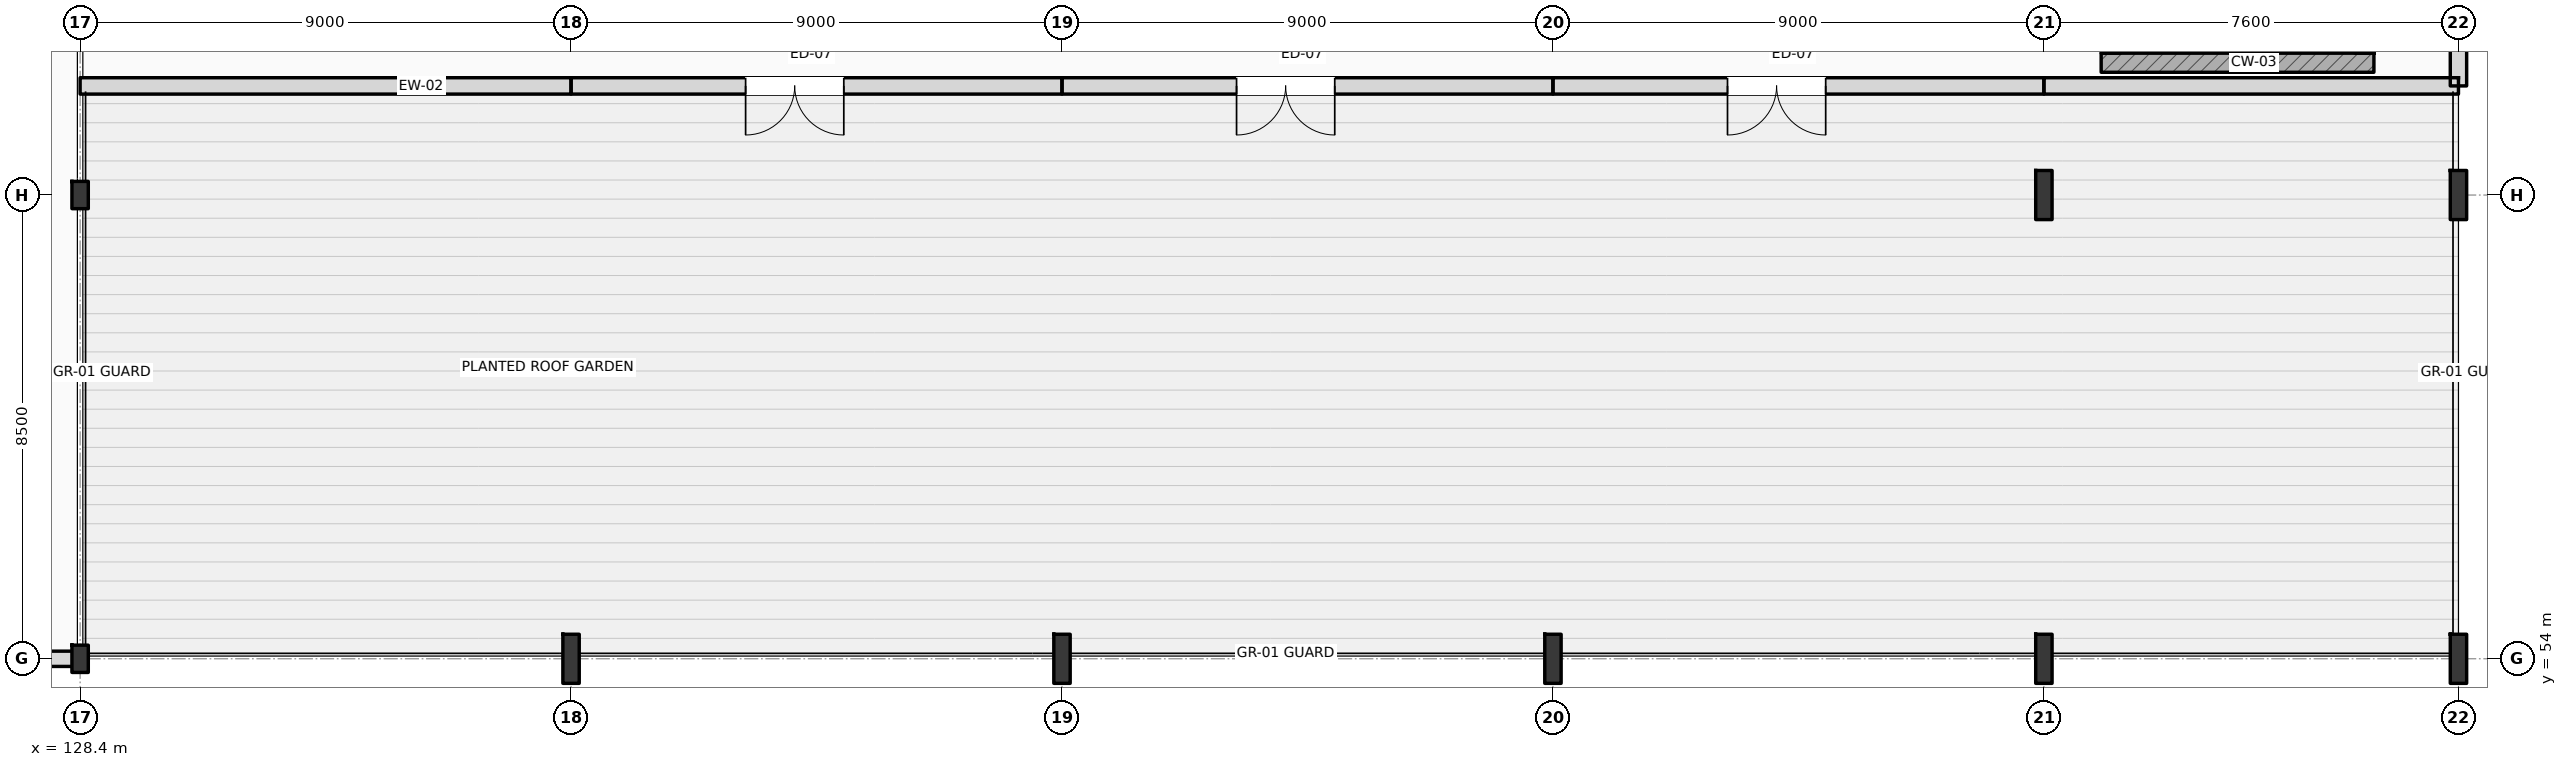
"""IFC4 building model, lengths in metres.
Left out: names, types, materials, properties, quantities, classifications, styles, units other than length and angle.
Written with IfcOpenShell. Run it as: python <this file> out.ifc"""

import sys

from ifc_helpers import new_model, si_unit, direction, frame, frame_2d, origin, origin_2d, place, context, subcontext, project, spatial, rectangle, i_section, extrude, element, fill, save


model = new_model("IFC4")
c1 = context("Model", 3, precision=1e-05, world=origin(), true_north=direction((0.0, 1.0)))
c2 = subcontext(c1, "Body", "Model", "MODEL_VIEW")
j1 = project(units=[si_unit("LENGTHUNIT", "METRE"), si_unit("PLANEANGLEUNIT", "RADIAN")], contexts=[c1])
p1 = place(None, origin())
s1 = spatial("IfcSite", under=j1, at=p1, CompositionType="ELEMENT")
p2 = place(p1, origin())
s2 = spatial("IfcBuilding", under=s1, at=p2, CompositionType="ELEMENT")
p3 = place(p2, frame((0.0, 0.0, 11.4)))
s3 = spatial("IfcBuildingStorey", under=s2, at=p3, CompositionType="ELEMENT", Elevation=11.4)
for number, where, z_axis, x_axis in (
    (1, (128.4, 54.0, 0.0), (0.0, 0.0, 1.0), (1.0, 0.0, 0.0)),
    (2, (128.4, 62.5, 0.0), (0.0, 0.0, 1.0), (1.0, 0.0, 0.0)),
):
    element("IfcColumn", number, at=place(p3, frame(where, z_axis=z_axis, x_axis=x_axis)), inside=s3, PredefinedType="COLUMN", context=c2, shape_type="SweptSolid", body=[
        extrude(i_section(OverallWidth=0.3, OverallDepth=0.5, WebThickness=0.014, FlangeThickness=0.028, FilletRadius=0.027, at=origin_2d()), origin(), (0.0, 0.0, 1.0), 4.8),
    ])
for number, where, z_axis, x_axis in (
    (3, (164.4, 54.0, 0.0), (0.0, 0.0, 1.0), (1.0, 0.0, 0.0)),
    (4, (164.4, 62.5, 0.0), (0.0, 0.0, 1.0), (1.0, 0.0, 0.0)),
    (5, (172.0, 54.0, 0.0), (0.0, 0.0, 1.0), (1.0, 0.0, 0.0)),
    (6, (172.0, 62.5, 0.0), (0.0, 0.0, 1.0), (1.0, 0.0, 0.0)),
    (7, (137.4, 54.0, 0.0), (0.0, 0.0, 1.0), (1.0, 0.0, 0.0)),
    (8, (146.4, 54.0, 0.0), (0.0, 0.0, 1.0), (1.0, 0.0, 0.0)),
    (9, (155.4, 54.0, 0.0), (0.0, 0.0, 1.0), (1.0, 0.0, 0.0)),
):
    element("IfcColumn", number, at=place(p3, frame(where, z_axis=z_axis, x_axis=x_axis)), inside=s3, PredefinedType="COLUMN", context=c2, shape_type="SweptSolid", body=[
        extrude(i_section(OverallWidth=0.3, OverallDepth=0.9, WebThickness=0.019, FlangeThickness=0.035, FilletRadius=0.03, at=origin_2d()), origin(), (0.0, 0.0, 1.0), 4.8),
    ])
p4 = place(p3, frame((165.45, 64.925, 0.0), z_axis=(0.0, 0.0, 1.0), x_axis=(1.0, 0.0, 0.0)))
e10 = element("IfcWall", 10, at=p4, inside=s3, PredefinedType="SHEAR", context=c2, shape_type="SweptSolid", body=[
    extrude(rectangle(XDim=5.0, YDim=0.35, at=frame_2d((2.5, 0.0))), origin(), (0.0, 0.0, 1.0), 4.8),
])
p5 = place(p3, frame((165.625, 65.1, 0.0), z_axis=(0.0, 0.0, 1.0), x_axis=(0.0, 1.0, 0.0)))
e11 = element("IfcWall", 11, at=p5, inside=s3, PredefinedType="SHEAR", context=c2, shape_type="SweptSolid", body=[
    extrude(rectangle(XDim=8.58, YDim=0.35, at=frame_2d((4.29, 0.0))), origin(), (0.0, 0.0, 1.0), 4.8),
])
p6 = place(p5, frame((0.225, 0.0, 0.0)))
e12 = element("IfcOpeningElement", 12, at=p6, cuts=e11, PredefinedType="OPENING", context=c2, shape_type="SweptSolid", body=[
    extrude(rectangle(XDim=1.6, YDim=2.2, at=frame_2d((0.8, 1.1))), frame((0.0, 0.185, 0.0), z_axis=(0.0, -1.0, 0.0), x_axis=(1.0, 0.0, 0.0)), (0.0, 0.0, 1.0), 0.37),
])
p7 = place(p3, frame((170.275, 65.1, 0.0), z_axis=(0.0, 0.0, 1.0), x_axis=(0.0, 1.0, 0.0)))
e13 = element("IfcWall", 13, at=p7, inside=s3, PredefinedType="SHEAR", context=c2, shape_type="SweptSolid", body=[
    extrude(rectangle(XDim=8.58, YDim=0.35, at=frame_2d((4.29, 0.0))), origin(), (0.0, 0.0, 1.0), 4.8),
])
p8 = place(p3, frame((103.2, 54.0, 0.0), z_axis=(0.0, 0.0, 1.0), x_axis=(1.0, 0.0, 0.0)))
e14 = element("IfcWall", 14, at=p8, inside=s3, PredefinedType="STANDARD", context=c2, shape_type="SweptSolid", body=[
    extrude(rectangle(XDim=25.2, YDim=0.28, at=frame_2d((12.6, 0.0))), origin(), (0.0, 0.0, 1.0), 3.96),
])
p9 = place(p3, frame((128.4, 64.5, 0.0), z_axis=(0.0, 0.0, 1.0), x_axis=(1.0, 0.0, 0.0)))
e15 = element("IfcWall", 15, at=p9, inside=s3, PredefinedType="STANDARD", context=c2, shape_type="SweptSolid", body=[
    extrude(rectangle(XDim=9.0, YDim=0.3, at=frame_2d((4.5, 0.0))), origin(), (0.0, 0.0, 1.0), 4.54),
])
p10 = place(p3, frame((137.4, 64.5, 0.0), z_axis=(0.0, 0.0, 1.0), x_axis=(1.0, 0.0, 0.0)))
e16 = element("IfcWall", 16, at=p10, inside=s3, PredefinedType="STANDARD", context=c2, shape_type="SweptSolid", body=[
    extrude(rectangle(XDim=9.0, YDim=0.3, at=frame_2d((4.5, 0.0))), origin(), (0.0, 0.0, 1.0), 4.54),
])
p11 = place(p10, frame((3.2, 0.0, 0.0)))
e17 = element("IfcOpeningElement", 17, at=p11, cuts=e16, PredefinedType="OPENING", context=c2, shape_type="SweptSolid", body=[
    extrude(rectangle(XDim=1.8, YDim=2.4, at=frame_2d((0.9, 1.2))), frame((0.0, 0.16, 0.0), z_axis=(0.0, -1.0, 0.0), x_axis=(1.0, 0.0, 0.0)), (0.0, 0.0, 1.0), 0.32),
])
p12 = place(p3, frame((146.4, 64.5, 0.0), z_axis=(0.0, 0.0, 1.0), x_axis=(1.0, 0.0, 0.0)))
e18 = element("IfcWall", 18, at=p12, inside=s3, PredefinedType="STANDARD", context=c2, shape_type="SweptSolid", body=[
    extrude(rectangle(XDim=9.0, YDim=0.3, at=frame_2d((4.5, 0.0))), origin(), (0.0, 0.0, 1.0), 4.54),
])
p13 = place(p12, frame((3.2, 0.0, 0.0)))
e19 = element("IfcOpeningElement", 19, at=p13, cuts=e18, PredefinedType="OPENING", context=c2, shape_type="SweptSolid", body=[
    extrude(rectangle(XDim=1.8, YDim=2.4, at=frame_2d((0.9, 1.2))), frame((0.0, 0.16, 0.0), z_axis=(0.0, -1.0, 0.0), x_axis=(1.0, 0.0, 0.0)), (0.0, 0.0, 1.0), 0.32),
])
p14 = place(p3, frame((155.4, 64.5, 0.0), z_axis=(0.0, 0.0, 1.0), x_axis=(1.0, 0.0, 0.0)))
e20 = element("IfcWall", 20, at=p14, inside=s3, PredefinedType="STANDARD", context=c2, shape_type="SweptSolid", body=[
    extrude(rectangle(XDim=9.0, YDim=0.3, at=frame_2d((4.5, 0.0))), origin(), (0.0, 0.0, 1.0), 4.54),
])
p15 = place(p14, frame((3.2, 0.0, 0.0)))
e21 = element("IfcOpeningElement", 21, at=p15, cuts=e20, PredefinedType="OPENING", context=c2, shape_type="SweptSolid", body=[
    extrude(rectangle(XDim=1.8, YDim=2.4, at=frame_2d((0.9, 1.2))), frame((0.0, 0.16, 0.0), z_axis=(0.0, -1.0, 0.0), x_axis=(1.0, 0.0, 0.0)), (0.0, 0.0, 1.0), 0.32),
])
p16 = place(p3, frame((164.4, 64.5, 0.0), z_axis=(0.0, 0.0, 1.0), x_axis=(1.0, 0.0, 0.0)))
e22 = element("IfcWall", 22, at=p16, inside=s3, PredefinedType="STANDARD", context=c2, shape_type="SweptSolid", body=[
    extrude(rectangle(XDim=7.6, YDim=0.3, at=frame_2d((3.8, 0.0))), origin(), (0.0, 0.0, 1.0), 4.54),
])
p17 = place(p3, frame((172.0, 64.5, 0.0), z_axis=(0.0, 0.0, 1.0), x_axis=(0.0, 1.0, 0.0)))
e23 = element("IfcWall", 23, at=p17, inside=s3, PredefinedType="STANDARD", context=c2, shape_type="SweptSolid", body=[
    extrude(rectangle(XDim=6.5, YDim=0.3, at=frame_2d((3.25, 0.0))), origin(), (0.0, 0.0, 1.0), 4.25),
])
p18 = place(p11, frame((1.8, 0.0, 0.0), z_axis=(0.0, 0.0, 1.0), x_axis=(-1.0, 0.0, 0.0)))
e24 = element("IfcDoor", 24, at=p18, inside=s3, OperationType="DOUBLE_SWING_LEFT", PredefinedType="DOOR", context=c2, shape_type="SweptSolid", body=[
    extrude(rectangle(XDim=1.8, YDim=2.4, at=frame_2d((0.9, 1.2))), frame((0.0, 0.025, 0.0), z_axis=(0.0, -1.0, 0.0), x_axis=(1.0, 0.0, 0.0)), (0.0, 0.0, 1.0), 0.05),
])
fill(e17, e24)
p19 = place(p13, frame((1.8, 0.0, 0.0), z_axis=(0.0, 0.0, 1.0), x_axis=(-1.0, 0.0, 0.0)))
e25 = element("IfcDoor", 25, at=p19, inside=s3, OperationType="DOUBLE_SWING_LEFT", PredefinedType="DOOR", context=c2, shape_type="SweptSolid", body=[
    extrude(rectangle(XDim=1.8, YDim=2.4, at=frame_2d((0.9, 1.2))), frame((0.0, 0.025, 0.0), z_axis=(0.0, -1.0, 0.0), x_axis=(1.0, 0.0, 0.0)), (0.0, 0.0, 1.0), 0.05),
])
fill(e19, e25)
p20 = place(p15, frame((1.8, 0.0, 0.0), z_axis=(0.0, 0.0, 1.0), x_axis=(-1.0, 0.0, 0.0)))
e26 = element("IfcDoor", 26, at=p20, inside=s3, OperationType="DOUBLE_SWING_LEFT", PredefinedType="DOOR", context=c2, shape_type="SweptSolid", body=[
    extrude(rectangle(XDim=1.8, YDim=2.4, at=frame_2d((0.9, 1.2))), frame((0.0, 0.025, 0.0), z_axis=(0.0, -1.0, 0.0), x_axis=(1.0, 0.0, 0.0)), (0.0, 0.0, 1.0), 0.05),
])
fill(e21, e26)
save(model, sys.argv[1])
